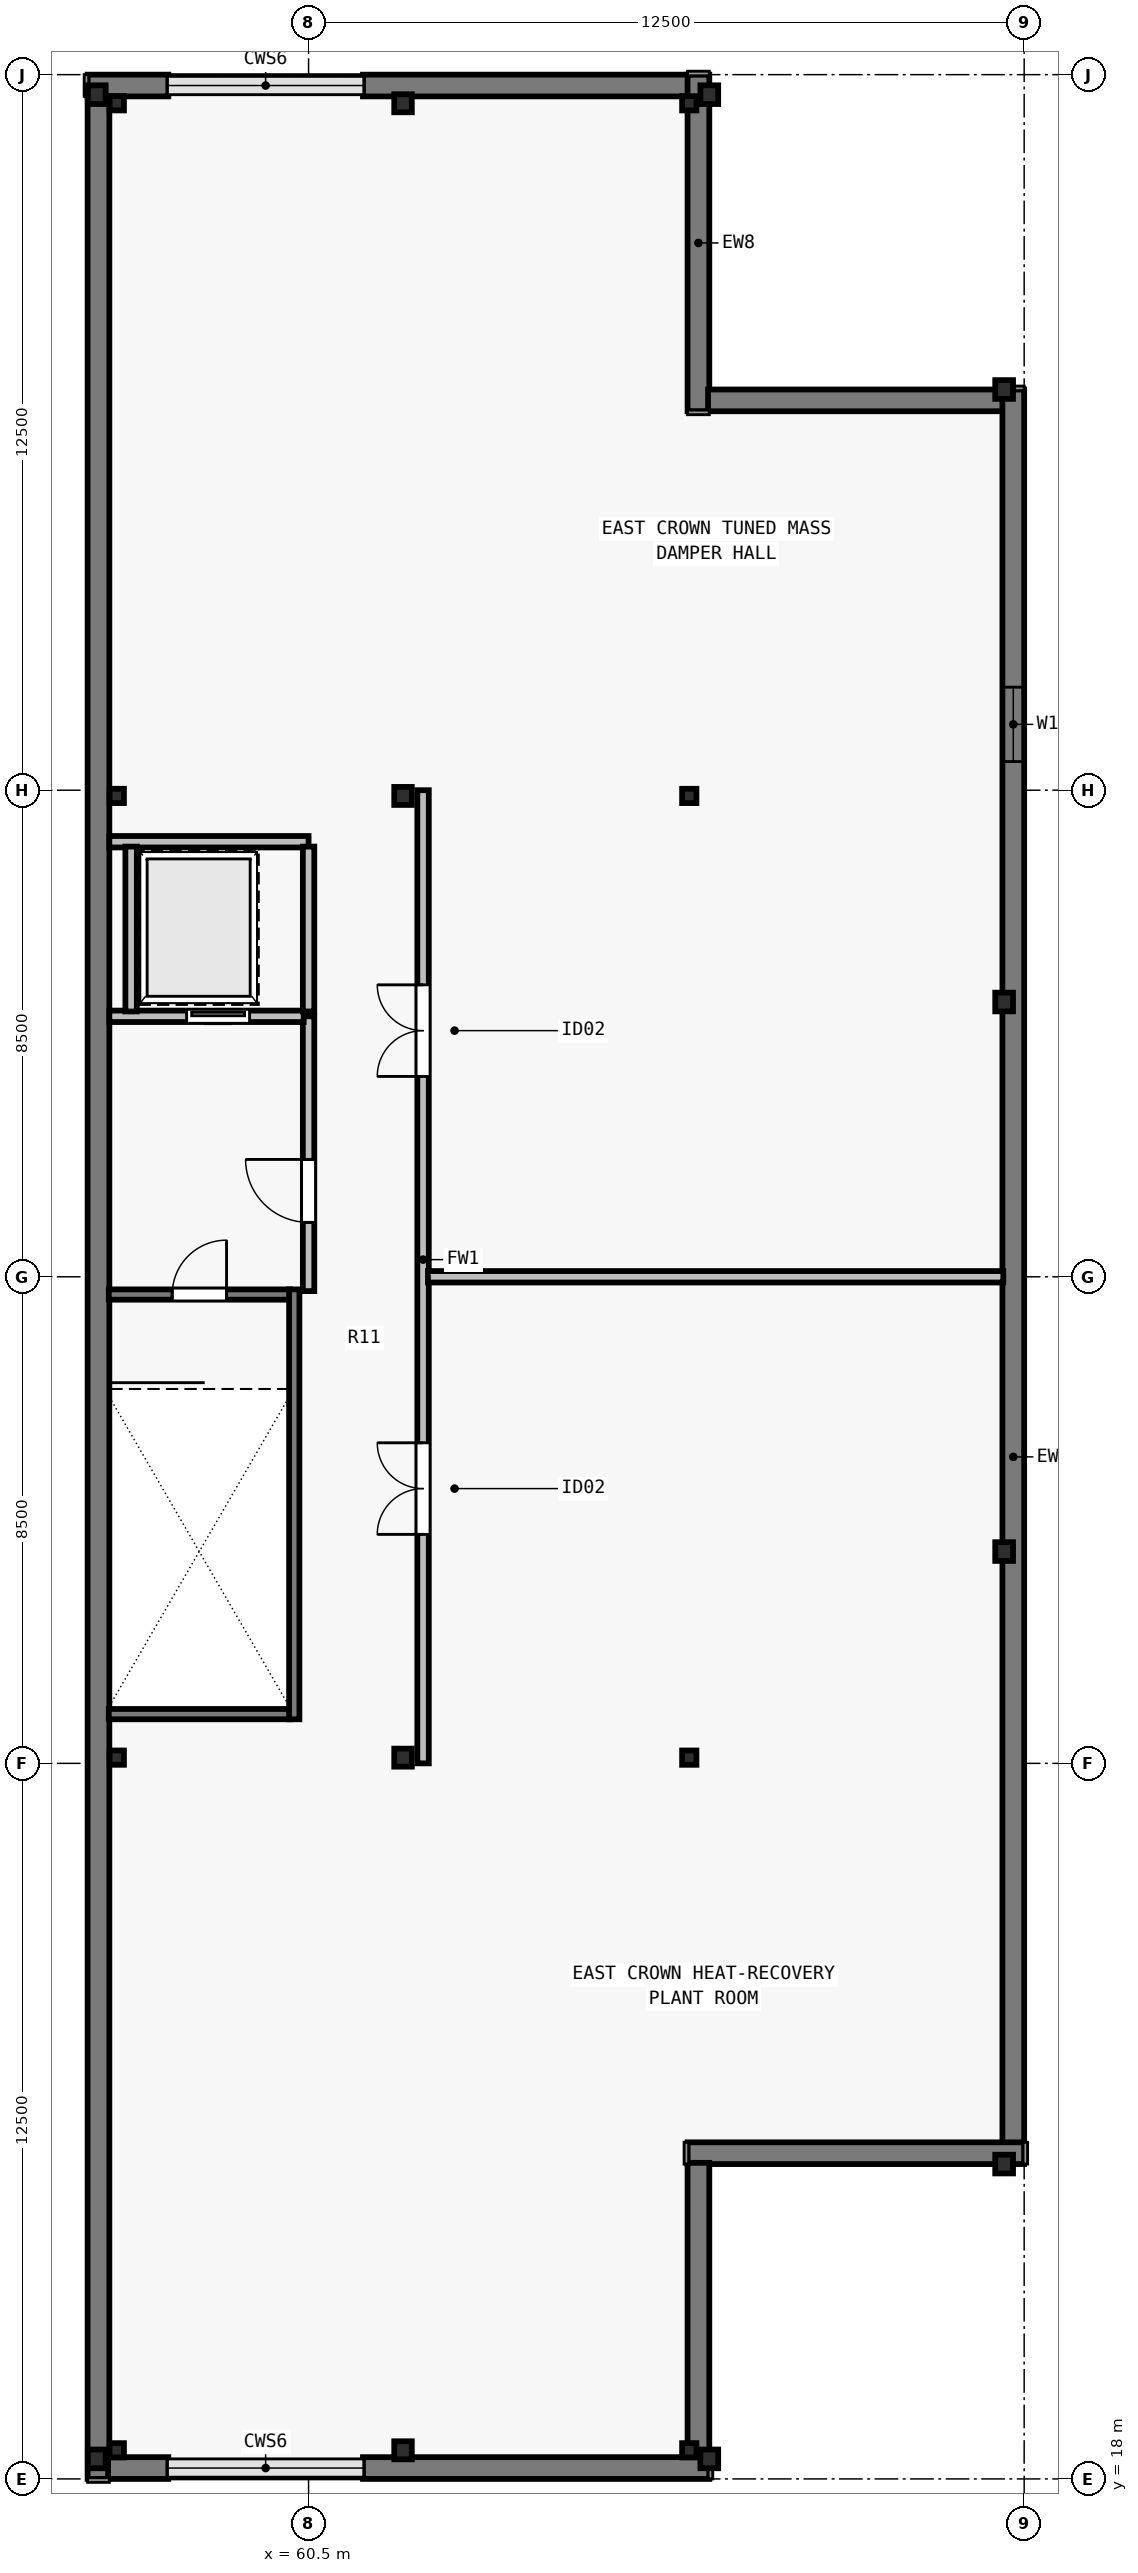
"""IFC4 building model, lengths in metres.
Left out: names, types, materials, properties, quantities, classifications, styles, units other than length and angle.
Written with IfcOpenShell. Run it as: python <this file> out.ifc"""

import sys

from ifc_helpers import new_model, si_unit, direction, frame, frame_2d, origin, origin_2d, place, context, subcontext, project, spatial, rectangle, i_section, extrude, element, fill, save


model = new_model("IFC4")
c1 = context("Model", 3, precision=1e-05, world=origin(), true_north=direction((0.0, 1.0)))
c2 = subcontext(c1, "Body", "Model", "MODEL_VIEW")
j1 = project(units=[si_unit("LENGTHUNIT", "METRE"), si_unit("PLANEANGLEUNIT", "RADIAN")], contexts=[c1])
p1 = place(None, origin())
s1 = spatial("IfcSite", under=j1, at=p1, CompositionType="ELEMENT")
p2 = place(p1, origin())
s2 = spatial("IfcBuilding", under=s1, at=p2, CompositionType="ELEMENT")
p3 = place(p2, frame((0.0, 0.0, 330.0)))
s3 = spatial("IfcBuildingStorey", under=s2, at=p3, CompositionType="ELEMENT", Elevation=330.0)
for number, where, z_axis, x_axis in (
    (1, (56.8, 18.35, 0.0), (0.0, 0.0, 1.0), (1.0, 0.0, 0.0)),
    (2, (67.5, 18.35, 0.0), (0.0, 0.0, 1.0), (1.0, 0.0, 0.0)),
    (3, (72.65, 23.5, 0.0), (0.0, 0.0, 1.0), (1.0, 0.0, 0.0)),
    (4, (72.65, 34.2, 0.0), (0.0, 0.0, 1.0), (1.0, 0.0, 0.0)),
    (5, (72.65, 43.8, 0.0), (0.0, 0.0, 1.0), (1.0, 0.0, 0.0)),
    (6, (72.65, 54.5, 0.0), (0.0, 0.0, 1.0), (1.0, 0.0, 0.0)),
    (7, (67.5, 59.65, 0.0), (0.0, 0.0, 1.0), (1.0, 0.0, 0.0)),
    (8, (56.8, 59.65, 0.0), (0.0, 0.0, 1.0), (1.0, 0.0, 0.0)),
):
    element("IfcColumn", number, at=place(p3, frame(where, z_axis=z_axis, x_axis=x_axis)), inside=s3, PredefinedType="COLUMN", context=c2, shape_type="SweptSolid", body=[
        extrude(i_section(OverallWidth=0.311, OverallDepth=0.327, WebThickness=0.016, FlangeThickness=0.025, FilletRadius=0.016, at=origin_2d()), origin(), (0.0, 0.0, 1.0), 5.5),
    ])
p4 = place(p3, frame((62.15, 18.5, 0.0), z_axis=(0.0, 0.0, 1.0), x_axis=(1.0, 0.0, 0.0)))
e9 = element("IfcColumn", 9, at=p4, inside=s3, PredefinedType="COLUMN", context=c2, shape_type="SweptSolid", body=[
    extrude(i_section(OverallWidth=0.307, OverallDepth=0.315, WebThickness=0.012, FlangeThickness=0.019, FilletRadius=0.016, at=origin_2d()), origin(), (0.0, 0.0, 1.0), 5.5),
])
for number, where, z_axis, x_axis in (
    (10, (57.15, 18.5, 0.0), (0.0, 0.0, 1.0), (1.0, 0.0, 0.0)),
    (11, (67.15, 18.5, 0.0), (0.0, 0.0, 1.0), (1.0, 0.0, 0.0)),
):
    element("IfcColumn", number, at=place(p3, frame(where, z_axis=z_axis, x_axis=x_axis)), inside=s3, PredefinedType="PILASTER", context=c2, shape_type="SweptSolid", body=[
        extrude(i_section(OverallWidth=0.203, OverallDepth=0.203, WebThickness=0.009, FlangeThickness=0.014, FilletRadius=0.01, at=origin_2d()), origin(), (0.0, 0.0, 1.0), 5.5),
    ])
p5 = place(p3, frame((62.15, 30.6, 0.0), z_axis=(0.0, 0.0, 1.0), x_axis=(1.0, 0.0, 0.0)))
e12 = element("IfcColumn", 12, at=p5, inside=s3, PredefinedType="COLUMN", context=c2, shape_type="SweptSolid", body=[
    extrude(i_section(OverallWidth=0.307, OverallDepth=0.315, WebThickness=0.012, FlangeThickness=0.019, FilletRadius=0.016, at=origin_2d()), origin(), (0.0, 0.0, 1.0), 5.5),
])
for number, where, z_axis, x_axis in (
    (13, (57.15, 30.6, 0.0), (0.0, 0.0, 1.0), (1.0, 0.0, 0.0)),
    (14, (67.15, 30.6, 0.0), (0.0, 0.0, 1.0), (1.0, 0.0, 0.0)),
):
    element("IfcColumn", number, at=place(p3, frame(where, z_axis=z_axis, x_axis=x_axis)), inside=s3, PredefinedType="PILASTER", context=c2, shape_type="SweptSolid", body=[
        extrude(i_section(OverallWidth=0.203, OverallDepth=0.203, WebThickness=0.009, FlangeThickness=0.014, FilletRadius=0.01, at=origin_2d()), origin(), (0.0, 0.0, 1.0), 5.5),
    ])
p6 = place(p3, frame((62.15, 47.4, 0.0), z_axis=(0.0, 0.0, 1.0), x_axis=(1.0, 0.0, 0.0)))
e15 = element("IfcColumn", 15, at=p6, inside=s3, PredefinedType="COLUMN", context=c2, shape_type="SweptSolid", body=[
    extrude(i_section(OverallWidth=0.307, OverallDepth=0.315, WebThickness=0.012, FlangeThickness=0.019, FilletRadius=0.016, at=origin_2d()), origin(), (0.0, 0.0, 1.0), 5.5),
])
for number, where, z_axis, x_axis in (
    (16, (57.15, 47.4, 0.0), (0.0, 0.0, 1.0), (1.0, 0.0, 0.0)),
    (17, (67.15, 47.4, 0.0), (0.0, 0.0, 1.0), (1.0, 0.0, 0.0)),
):
    element("IfcColumn", number, at=place(p3, frame(where, z_axis=z_axis, x_axis=x_axis)), inside=s3, PredefinedType="PILASTER", context=c2, shape_type="SweptSolid", body=[
        extrude(i_section(OverallWidth=0.203, OverallDepth=0.203, WebThickness=0.009, FlangeThickness=0.014, FilletRadius=0.01, at=origin_2d()), origin(), (0.0, 0.0, 1.0), 5.5),
    ])
p7 = place(p3, frame((62.15, 59.5, 0.0), z_axis=(0.0, 0.0, 1.0), x_axis=(1.0, 0.0, 0.0)))
e18 = element("IfcColumn", 18, at=p7, inside=s3, PredefinedType="COLUMN", context=c2, shape_type="SweptSolid", body=[
    extrude(i_section(OverallWidth=0.307, OverallDepth=0.315, WebThickness=0.012, FlangeThickness=0.019, FilletRadius=0.016, at=origin_2d()), origin(), (0.0, 0.0, 1.0), 5.5),
])
for number, where, z_axis, x_axis in (
    (19, (57.15, 59.5, 0.0), (0.0, 0.0, 1.0), (1.0, 0.0, 0.0)),
    (20, (67.15, 59.5, 0.0), (0.0, 0.0, 1.0), (1.0, 0.0, 0.0)),
):
    element("IfcColumn", number, at=place(p3, frame(where, z_axis=z_axis, x_axis=x_axis)), inside=s3, PredefinedType="PILASTER", context=c2, shape_type="SweptSolid", body=[
        extrude(i_section(OverallWidth=0.203, OverallDepth=0.203, WebThickness=0.009, FlangeThickness=0.014, FilletRadius=0.01, at=origin_2d()), origin(), (0.0, 0.0, 1.0), 5.5),
    ])
p8 = place(p3, frame((56.83, 18.0, 0.0), z_axis=(0.0, 0.0, 1.0), x_axis=(0.0, 1.0, 0.0)))
e21 = element("IfcWall", 21, at=p8, inside=s3, PredefinedType="SOLIDWALL", context=c2, shape_type="SweptSolid", body=[
    extrude(rectangle(XDim=41.642, YDim=0.38, at=frame_2d((20.821, 0.0))), origin(), (0.0, 0.0, 1.0), 5.25),
])
p9 = place(p3, frame((56.64, 59.81, 0.0), z_axis=(0.0, 0.0, 1.0), x_axis=(1.0, 0.0, 0.0)))
e22 = element("IfcWall", 22, at=p9, inside=s3, PredefinedType="SOLIDWALL", context=c2, shape_type="SweptSolid", body=[
    extrude(rectangle(XDim=1.41, YDim=0.38, at=frame_2d((0.705, 0.0))), origin(), (0.0, 0.0, 1.0), 5.25),
])
p10 = place(p3, frame((61.45, 59.81, 0.0), z_axis=(0.0, 0.0, 1.0), x_axis=(1.0, 0.0, 0.0)))
e23 = element("IfcWall", 23, at=p10, inside=s3, PredefinedType="SOLIDWALL", context=c2, shape_type="SweptSolid", body=[
    extrude(rectangle(XDim=5.692, YDim=0.38, at=frame_2d((2.846, 0.0))), origin(), (0.0, 0.0, 1.0), 5.25),
])
p11 = place(p3, frame((67.31, 60.0, 0.0), z_axis=(0.0, 0.0, 1.0), x_axis=(0.0, -1.0, 0.0)))
e24 = element("IfcWall", 24, at=p11, inside=s3, PredefinedType="SOLIDWALL", context=c2, shape_type="SweptSolid", body=[
    extrude(rectangle(XDim=5.88, YDim=0.38, at=frame_2d((2.94, 0.0))), origin(), (0.0, 0.0, 1.0), 5.25),
])
p12 = place(p3, frame((67.478, 54.31, 0.0), z_axis=(0.0, 0.0, 1.0), x_axis=(1.0, 0.0, 0.0)))
e25 = element("IfcWall", 25, at=p12, inside=s3, PredefinedType="SOLIDWALL", context=c2, shape_type="SweptSolid", body=[
    extrude(rectangle(XDim=5.164, YDim=0.38, at=frame_2d((2.582, 0.0))), origin(), (0.0, 0.0, 1.0), 5.25),
])
p13 = place(p3, frame((72.81, 54.5, 0.0), z_axis=(0.0, 0.0, 1.0), x_axis=(0.0, -1.0, 0.0)))
e26 = element("IfcWall", 26, at=p13, inside=s3, PredefinedType="SOLIDWALL", context=c2, shape_type="SweptSolid", body=[
    extrude(rectangle(XDim=30.642, YDim=0.38, at=frame_2d((15.321, 0.0))), origin(), (0.0, 0.0, 1.0), 5.25),
])
p14 = place(p13, frame((5.2, 0.0, 0.8)))
e27 = element("IfcOpeningElement", 27, at=p14, cuts=e26, PredefinedType="OPENING", context=c2, shape_type="SweptSolid", body=[
    extrude(rectangle(XDim=1.3, YDim=2.05, at=frame_2d((0.65, 1.025))), frame((0.0, 0.2, 0.0), z_axis=(0.0, -1.0, 0.0), x_axis=(1.0, 0.0, 0.0)), (0.0, 0.0, 1.0), 0.4),
])
p15 = place(p3, frame((73.0, 23.69, 0.0), z_axis=(0.0, 0.0, 1.0), x_axis=(-1.0, 0.0, 0.0)))
e28 = element("IfcWall", 28, at=p15, inside=s3, PredefinedType="SOLIDWALL", context=c2, shape_type="SweptSolid", body=[
    extrude(rectangle(XDim=5.88, YDim=0.38, at=frame_2d((2.94, 0.0))), origin(), (0.0, 0.0, 1.0), 5.25),
])
p16 = place(p3, frame((67.31, 23.522, 0.0), z_axis=(0.0, 0.0, 1.0), x_axis=(0.0, -1.0, 0.0)))
e29 = element("IfcWall", 29, at=p16, inside=s3, PredefinedType="SOLIDWALL", context=c2, shape_type="SweptSolid", body=[
    extrude(rectangle(XDim=5.164, YDim=0.38, at=frame_2d((2.582, 0.0))), origin(), (0.0, 0.0, 1.0), 5.25),
])
p17 = place(p3, frame((67.5, 18.19, 0.0), z_axis=(0.0, 0.0, 1.0), x_axis=(-1.0, 0.0, 0.0)))
e30 = element("IfcWall", 30, at=p17, inside=s3, PredefinedType="SOLIDWALL", context=c2, shape_type="SweptSolid", body=[
    extrude(rectangle(XDim=6.05, YDim=0.38, at=frame_2d((3.025, 0.0))), origin(), (0.0, 0.0, 1.0), 5.25),
])
p18 = place(p3, frame((58.05, 18.19, 0.0), z_axis=(0.0, 0.0, 1.0), x_axis=(-1.0, 0.0, 0.0)))
e31 = element("IfcWall", 31, at=p18, inside=s3, PredefinedType="SOLIDWALL", context=c2, shape_type="SweptSolid", body=[
    extrude(rectangle(XDim=1.052, YDim=0.38, at=frame_2d((0.526, 0.0))), origin(), (0.0, 0.0, 1.0), 5.25),
])
p19 = place(p3, frame((60.5, 38.75, 0.0), z_axis=(0.0, 0.0, 1.0), x_axis=(0.0, 1.0, 0.0)))
e32 = element("IfcWall", 32, at=p19, inside=s3, PredefinedType="SOLIDWALL", context=c2, shape_type="SweptSolid", body=[
    extrude(rectangle(XDim=4.8, YDim=0.2, at=frame_2d((2.4, 0.0))), origin(), (0.0, 0.0, 1.0), 5.25),
])
p20 = place(p19, frame((1.2, 0.0, 0.0)))
e33 = element("IfcOpeningElement", 33, at=p20, cuts=e32, PredefinedType="OPENING", context=c2, shape_type="SweptSolid", body=[
    extrude(rectangle(XDim=1.1, YDim=2.15, at=frame_2d((0.55, 1.075))), frame((0.0, 0.11, 0.0), z_axis=(0.0, -1.0, 0.0), x_axis=(1.0, 0.0, 0.0)), (0.0, 0.0, 1.0), 0.22),
])
p21 = place(p3, frame((57.02, 43.55, 0.0), z_axis=(0.0, 0.0, 1.0), x_axis=(1.0, 0.0, 0.0)))
e34 = element("IfcWall", 34, at=p21, inside=s3, PredefinedType="SOLIDWALL", context=c2, shape_type="SweptSolid", body=[
    extrude(rectangle(XDim=3.395, YDim=0.2, at=frame_2d((1.698, 0.0))), origin(), (0.0, 0.0, 1.0), 5.25),
])
p22 = place(p21, frame((1.35, 0.0, 0.0)))
e35 = element("IfcOpeningElement", 35, at=p22, cuts=e34, PredefinedType="OPENING", context=c2, shape_type="SweptSolid", body=[
    extrude(rectangle(XDim=1.1, YDim=2.2, at=frame_2d((0.55, 1.1))), frame((0.0, 0.11, 0.0), z_axis=(0.0, -1.0, 0.0), x_axis=(1.0, 0.0, 0.0)), (0.0, 0.0, 1.0), 0.22),
])
p23 = place(p3, frame((57.02, 46.6, 0.0), z_axis=(0.0, 0.0, 1.0), x_axis=(1.0, 0.0, 0.0)))
e36 = element("IfcWall", 36, at=p23, inside=s3, PredefinedType="SOLIDWALL", context=c2, shape_type="SweptSolid", body=[
    extrude(rectangle(XDim=3.48, YDim=0.2, at=frame_2d((1.74, 0.0))), origin(), (0.0, 0.0, 1.0), 5.25),
])
for number, where, z_axis, x_axis in (
    (37, (57.4, 43.635, 0.0), (0.0, 0.0, 1.0), (0.0, 1.0, 0.0)),
    (38, (60.5, 43.635, 0.0), (0.0, 0.0, 1.0), (0.0, 1.0, 0.0)),
):
    element("IfcWall", number, at=place(p3, frame(where, z_axis=z_axis, x_axis=x_axis)), inside=s3, PredefinedType="SOLIDWALL", context=c2, shape_type="SweptSolid", body=[
        extrude(rectangle(XDim=2.88, YDim=0.2, at=frame_2d((1.44, 0.0))), origin(), (0.0, 0.0, 1.0), 5.25),
    ])
p24 = place(p3, frame((62.5, 30.5, 0.0), z_axis=(0.0, 0.0, 1.0), x_axis=(0.0, 1.0, 0.0)))
e39 = element("IfcWall", 39, at=p24, inside=s3, PredefinedType="SOLIDWALL", context=c2, shape_type="SweptSolid", body=[
    extrude(rectangle(XDim=17.0, YDim=0.2, at=frame_2d((8.5, 0.0))), origin(), (0.0, 0.0, 1.0), 5.25),
])
p25 = place(p24, frame((4.0, 0.0, 0.0)))
e40 = element("IfcOpeningElement", 40, at=p25, cuts=e39, PredefinedType="OPENING", context=c2, shape_type="SweptSolid", body=[
    extrude(rectangle(XDim=1.6, YDim=2.2, at=frame_2d((0.8, 1.1))), frame((0.0, 0.11, 0.0), z_axis=(0.0, -1.0, 0.0), x_axis=(1.0, 0.0, 0.0)), (0.0, 0.0, 1.0), 0.22),
])
p26 = place(p24, frame((12.0, 0.0, 0.0)))
e41 = element("IfcOpeningElement", 41, at=p26, cuts=e39, PredefinedType="OPENING", context=c2, shape_type="SweptSolid", body=[
    extrude(rectangle(XDim=1.6, YDim=2.2, at=frame_2d((0.8, 1.1))), frame((0.0, 0.11, 0.0), z_axis=(0.0, -1.0, 0.0), x_axis=(1.0, 0.0, 0.0)), (0.0, 0.0, 1.0), 0.22),
])
p27 = place(p3, frame((62.585, 39.0, 0.0), z_axis=(0.0, 0.0, 1.0), x_axis=(1.0, 0.0, 0.0)))
e42 = element("IfcWall", 42, at=p27, inside=s3, PredefinedType="SOLIDWALL", context=c2, shape_type="SweptSolid", body=[
    extrude(rectangle(XDim=10.05, YDim=0.2, at=frame_2d((5.025, 0.0))), origin(), (0.0, 0.0, 1.0), 5.25),
])
p28 = place(p3, frame((57.01, 38.69, 0.0), z_axis=(0.0, 0.0, 1.0), x_axis=(1.0, 0.0, 0.0)))
e43 = element("IfcWall", 43, at=p28, inside=s3, PredefinedType="SOLIDWALL", context=c2, shape_type="SweptSolid", body=[
    extrude(rectangle(XDim=3.165, YDim=0.18, at=frame_2d((1.583, 0.0))), origin(), (0.0, 0.0, 1.0), 5.25),
])
p29 = place(p28, frame((1.107, 0.0, 0.0)))
e44 = element("IfcOpeningElement", 44, at=p29, cuts=e43, PredefinedType="OPENING", context=c2, shape_type="SweptSolid", body=[
    extrude(rectangle(XDim=0.95, YDim=2.15, at=frame_2d((0.475, 1.075))), frame((0.0, 0.1, 0.0), z_axis=(0.0, -1.0, 0.0), x_axis=(1.0, 0.0, 0.0)), (0.0, 0.0, 1.0), 0.2),
])
p30 = place(p3, frame((57.01, 31.36, 0.0), z_axis=(0.0, 0.0, 1.0), x_axis=(1.0, 0.0, 0.0)))
e45 = element("IfcWall", 45, at=p30, inside=s3, PredefinedType="SOLIDWALL", context=c2, shape_type="SweptSolid", body=[
    extrude(rectangle(XDim=3.165, YDim=0.18, at=frame_2d((1.583, 0.0))), origin(), (0.0, 0.0, 1.0), 5.25),
])
p31 = place(p3, frame((60.25, 38.78, 0.0), z_axis=(0.0, 0.0, 1.0), x_axis=(0.0, -1.0, 0.0)))
e46 = element("IfcWall", 46, at=p31, inside=s3, PredefinedType="SOLIDWALL", context=c2, shape_type="SweptSolid", body=[
    extrude(rectangle(XDim=7.51, YDim=0.18, at=frame_2d((3.755, 0.0))), origin(), (0.0, 0.0, 1.0), 5.25),
])
p32 = place(p14, origin())
e47 = element("IfcWindow", 47, at=p32, inside=s3, PartitioningType="SINGLE_PANEL", PredefinedType="WINDOW", context=c2, shape_type="SweptSolid", body=[
    extrude(rectangle(XDim=1.3, YDim=2.05, at=frame_2d((0.65, 1.025))), frame((0.0, -0.05, 0.0), z_axis=(0.0, -1.0, 0.0), x_axis=(1.0, 0.0, 0.0)), (0.0, 0.0, 1.0), 0.06),
])
fill(e27, e47)
p33 = place(p20, origin())
e48 = element("IfcDoor", 48, at=p33, inside=s3, OperationType="SINGLE_SWING_RIGHT", PredefinedType="DOOR", context=c2, shape_type="SweptSolid", body=[
    extrude(rectangle(XDim=1.1, YDim=2.15, at=frame_2d((0.55, 1.075))), frame((0.0, 0.025, 0.0), z_axis=(0.0, -1.0, 0.0), x_axis=(1.0, 0.0, 0.0)), (0.0, 0.0, 1.0), 0.05),
])
fill(e33, e48)
p34 = place(p22, origin())
e49 = element("IfcDoor", 49, at=p34, inside=s3, OperationType="SLIDING_TO_LEFT", PredefinedType="DOOR", context=c2, shape_type="SweptSolid", body=[
    extrude(rectangle(XDim=1.1, YDim=2.2, at=frame_2d((0.55, 1.1))), frame((0.0, 0.025, 0.0), z_axis=(0.0, -1.0, 0.0), x_axis=(1.0, 0.0, 0.0)), (0.0, 0.0, 1.0), 0.05),
])
fill(e35, e49)
p35 = place(p25, origin())
e50 = element("IfcDoor", 50, at=p35, inside=s3, OperationType="DOUBLE_DOOR_SINGLE_SWING", PredefinedType="DOOR", context=c2, shape_type="SweptSolid", body=[
    extrude(rectangle(XDim=1.6, YDim=2.2, at=frame_2d((0.8, 1.1))), frame((0.0, 0.025, 0.0), z_axis=(0.0, -1.0, 0.0), x_axis=(1.0, 0.0, 0.0)), (0.0, 0.0, 1.0), 0.05),
])
fill(e40, e50)
p36 = place(p26, origin())
e51 = element("IfcDoor", 51, at=p36, inside=s3, OperationType="DOUBLE_DOOR_SINGLE_SWING", PredefinedType="DOOR", context=c2, shape_type="SweptSolid", body=[
    extrude(rectangle(XDim=1.6, YDim=2.2, at=frame_2d((0.8, 1.1))), frame((0.0, 0.025, 0.0), z_axis=(0.0, -1.0, 0.0), x_axis=(1.0, 0.0, 0.0)), (0.0, 0.0, 1.0), 0.05),
])
fill(e41, e51)
p37 = place(p29, origin())
e52 = element("IfcDoor", 52, at=p37, inside=s3, OperationType="SINGLE_SWING_RIGHT", PredefinedType="DOOR", context=c2, shape_type="SweptSolid", body=[
    extrude(rectangle(XDim=0.95, YDim=2.15, at=frame_2d((0.475, 1.075))), frame((0.0, 0.025, 0.0), z_axis=(0.0, -1.0, 0.0), x_axis=(1.0, 0.0, 0.0)), (0.0, 0.0, 1.0), 0.05),
])
fill(e44, e52)
save(model, sys.argv[1])
